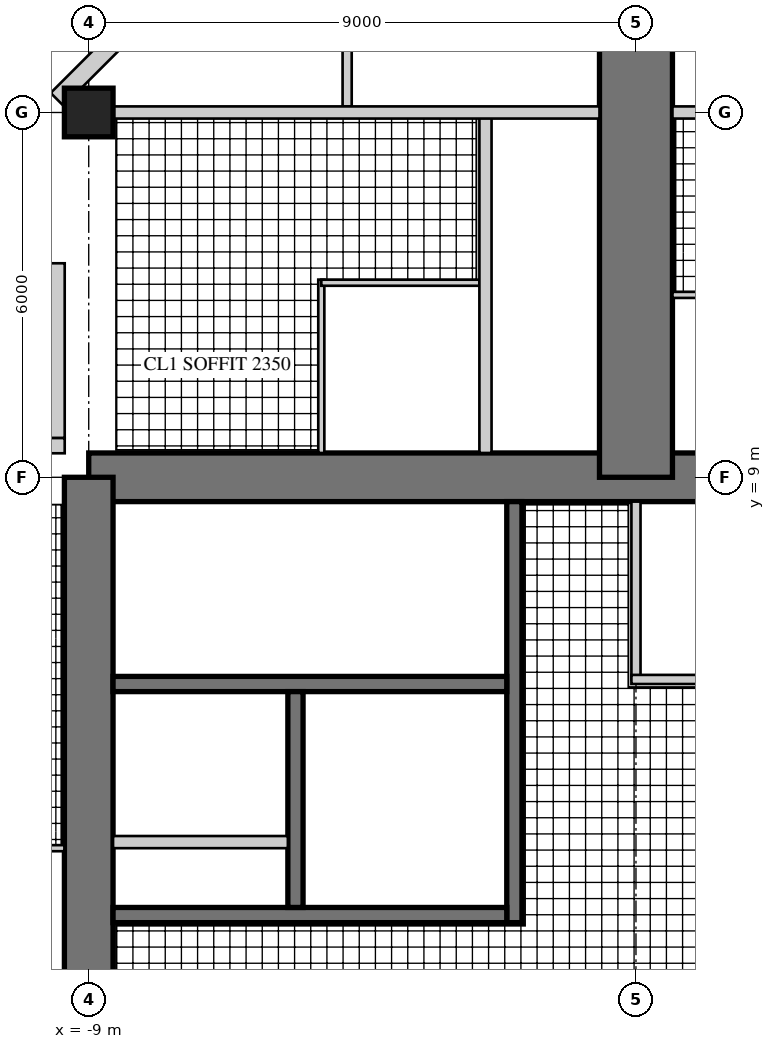
"""IFC4 building model, lengths in metres.
Left out: names, types, materials, properties, quantities, classifications, styles, units other than length and angle.
Written with IfcOpenShell. Run it as: python <this file> out.ifc"""

import sys

from ifc_helpers import new_model, si_unit, direction, frame, frame_2d, origin, origin_2d, place, context, subcontext, project, spatial, rectangle, hollow_rectangle, extrude, element, fill, save


model = new_model("IFC4")
c1 = context("Model", 3, precision=1e-05, world=origin(), true_north=direction((0.0, 1.0)))
c2 = subcontext(c1, "Body", "Model", "MODEL_VIEW")
j1 = project(units=[si_unit("LENGTHUNIT", "METRE"), si_unit("PLANEANGLEUNIT", "RADIAN")], contexts=[c1])
p1 = place(None, origin())
s1 = spatial("IfcSite", under=j1, at=p1, CompositionType="ELEMENT")
p2 = place(p1, origin())
s2 = spatial("IfcBuilding", under=s1, at=p2, CompositionType="ELEMENT")
p3 = place(p2, frame((0.0, 0.0, 225.5)))
s3 = spatial("IfcBuildingStorey", under=s2, at=p3, CompositionType="ELEMENT", Elevation=225.5)
p4 = place(p3, frame((9.0, 9.0, 0.0), z_axis=(0.0, 0.0, 1.0), x_axis=(-1.0, 0.0, 0.0)))
e1 = element("IfcWall", 1, at=p4, inside=s3, PredefinedType="SHEAR", context=c2, shape_type="SweptSolid", body=[
    extrude(rectangle(XDim=18.0, YDim=0.8, at=frame_2d((9.0, 0.0))), origin(), (0.0, 0.0, 1.0), 3.4),
])
p5 = place(p4, frame((9.8, 0.0, 0.0)))
e2 = element("IfcOpeningElement", 2, at=p5, cuts=e1, PredefinedType="OPENING", context=c2, shape_type="SweptSolid", body=[
    extrude(rectangle(XDim=1.0, YDim=2.4, at=frame_2d((0.5, 1.2))), frame((0.0, 0.41, 0.0), z_axis=(0.0, -1.0, 0.0), x_axis=(1.0, 0.0, 0.0)), (0.0, 0.0, 1.0), 0.82),
])
p6 = place(p3, frame((-9.0, 9.0, 0.0), z_axis=(0.0, 0.0, 1.0), x_axis=(0.0, -1.0, 0.0)))
e3 = element("IfcWall", 3, at=p6, inside=s3, PredefinedType="SHEAR", context=c2, shape_type="SweptSolid", body=[
    extrude(rectangle(XDim=18.0, YDim=0.8, at=frame_2d((9.0, 0.0))), origin(), (0.0, 0.0, 1.0), 3.4),
])
p7 = place(p6, frame((9.8, 0.0, 0.0)))
e4 = element("IfcOpeningElement", 4, at=p7, cuts=e3, PredefinedType="OPENING", context=c2, shape_type="SweptSolid", body=[
    extrude(rectangle(XDim=1.0, YDim=2.4, at=frame_2d((0.5, 1.2))), frame((0.0, 0.41, 0.0), z_axis=(0.0, -1.0, 0.0), x_axis=(1.0, 0.0, 0.0)), (0.0, 0.0, 1.0), 0.82),
])
p8 = place(p3, frame((-2.0, 1.675, 0.0), z_axis=(0.0, 0.0, 1.0), x_axis=(0.0, 1.0, 0.0)))
e5 = element("IfcWall", 5, at=p8, inside=s3, PredefinedType="SHEAR", context=c2, shape_type="SweptSolid", body=[
    extrude(rectangle(XDim=6.925, YDim=0.25, at=frame_2d((3.462, 0.0))), origin(), (0.0, 0.0, 1.0), 3.4),
])
p9 = place(p8, frame((0.725, 0.0, 0.0)))
e6 = element("IfcOpeningElement", 6, at=p9, cuts=e5, PredefinedType="OPENING", context=c2, shape_type="SweptSolid", body=[
    extrude(rectangle(XDim=1.0, YDim=2.1, at=frame_2d((0.5, 1.05))), frame((0.0, 0.135, 0.0), z_axis=(0.0, -1.0, 0.0), x_axis=(1.0, 0.0, 0.0)), (0.0, 0.0, 1.0), 0.27),
])
p10 = place(p3, frame((-2.125, 1.8, 0.0), z_axis=(0.0, 0.0, 1.0), x_axis=(-1.0, 0.0, 0.0)))
e7 = element("IfcWall", 7, at=p10, inside=s3, PredefinedType="SHEAR", context=c2, shape_type="SweptSolid", body=[
    extrude(rectangle(XDim=6.475, YDim=0.25, at=frame_2d((3.238, 0.0))), origin(), (0.0, 0.0, 1.0), 3.4),
])
p11 = place(p3, frame((-2.125, 5.6, 0.0), z_axis=(0.0, 0.0, 1.0), x_axis=(-1.0, 0.0, 0.0)))
e8 = element("IfcWall", 8, at=p11, inside=s3, PredefinedType="SHEAR", context=c2, shape_type="SweptSolid", body=[
    extrude(rectangle(XDim=6.475, YDim=0.25, at=frame_2d((3.238, 0.0))), origin(), (0.0, 0.0, 1.0), 3.4),
])
p12 = place(p11, frame((0.175, 0.0, 0.0)))
e9 = element("IfcOpeningElement", 9, at=p12, cuts=e8, PredefinedType="OPENING", context=c2, shape_type="SweptSolid", body=[
    extrude(rectangle(XDim=1.0, YDim=2.1, at=frame_2d((0.5, 1.05))), frame((0.0, 0.135, 0.0), z_axis=(0.0, -1.0, 0.0), x_axis=(1.0, 0.0, 0.0)), (0.0, 0.0, 1.0), 0.27),
])
p13 = place(p3, frame((-5.6, 1.925, 0.0), z_axis=(0.0, 0.0, 1.0), x_axis=(0.0, 1.0, 0.0)))
e10 = element("IfcWall", 10, at=p13, inside=s3, PredefinedType="SHEAR", context=c2, shape_type="SweptSolid", body=[
    extrude(rectangle(XDim=3.55, YDim=0.25, at=frame_2d((1.775, 0.0))), origin(), (0.0, 0.0, 1.0), 3.4),
])
p14 = place(p13, frame((1.525, 0.0, 0.0)))
e11 = element("IfcOpeningElement", 11, at=p14, cuts=e10, PredefinedType="OPENING", context=c2, shape_type="SweptSolid", body=[
    extrude(rectangle(XDim=1.1, YDim=2.2, at=frame_2d((0.55, 1.1))), frame((0.0, 0.135, 0.0), z_axis=(0.0, -1.0, 0.0), x_axis=(1.0, 0.0, 0.0)), (0.0, 0.0, 1.0), 0.27),
])
p15 = place(p13, frame((0.075, 0.0, 0.0)))
e12 = element("IfcOpeningElement", 12, at=p15, cuts=e10, PredefinedType="OPENING", context=c2, shape_type="SweptSolid", body=[
    extrude(rectangle(XDim=0.8, YDim=2.1, at=frame_2d((0.4, 1.05))), frame((0.0, 0.135, 0.0), z_axis=(0.0, -1.0, 0.0), x_axis=(1.0, 0.0, 0.0)), (0.0, 0.0, 1.0), 0.27),
])
p16 = place(p3, frame((-5.725, 3.0, 0.0), z_axis=(0.0, 0.0, 1.0), x_axis=(-1.0, 0.0, 0.0)))
e13 = element("IfcWall", 13, at=p16, inside=s3, PredefinedType="PARTITIONING", context=c2, shape_type="SweptSolid", body=[
    extrude(rectangle(XDim=2.875, YDim=0.2, at=frame_2d((1.438, 0.0))), origin(), (0.0, 0.0, 1.0), 3.4),
])
p17 = place(p3, frame((0.0, 9.0, 0.0), z_axis=(0.0, 0.0, 1.0), x_axis=(0.0, 1.0, 0.0)))
e14 = element("IfcWall", 14, at=p17, inside=s3, PredefinedType="SHEAR", context=c2, shape_type="SweptSolid", body=[
    extrude(rectangle(XDim=9.0, YDim=1.2, at=frame_2d((4.5, 0.0))), origin(), (0.0, 0.0, 1.0), 3.4),
])
p18 = place(p17, frame((3.8, 0.0, 0.0)))
e15 = element("IfcOpeningElement", 15, at=p18, cuts=e14, PredefinedType="OPENING", context=c2, shape_type="SweptSolid", body=[
    extrude(rectangle(XDim=1.0, YDim=2.15, at=frame_2d((0.5, 1.075))), frame((0.0, 0.61, 0.0), z_axis=(0.0, -1.0, 0.0), x_axis=(1.0, 0.0, 0.0)), (0.0, 0.0, 1.0), 1.22),
])
p19 = place(p17, frame((7.0, 0.0, 0.0)))
e16 = element("IfcOpeningElement", 16, at=p19, cuts=e14, PredefinedType="OPENING", context=c2, shape_type="SweptSolid", body=[
    extrude(rectangle(XDim=1.0, YDim=2.2, at=frame_2d((0.5, 1.1))), frame((0.0, 0.61, 0.0), z_axis=(0.0, -1.0, 0.0), x_axis=(1.0, 0.0, 0.0)), (0.0, 0.0, 1.0), 1.22),
])
p20 = place(p3, frame((-9.0, 15.0, 0.0), z_axis=(0.0, 0.0, 1.0), x_axis=(1.0, 0.0, 0.0)))
e17 = element("IfcColumn", 17, at=p20, inside=s3, PredefinedType="COLUMN", context=c2, shape_type="SweptSolid", body=[
    extrude(rectangle(XDim=0.8, YDim=0.8, at=origin_2d()), origin(), (0.0, 0.0, 1.0), 3.4),
])
p21 = place(p3, frame((-6.135, 18.6, 0.0), z_axis=(0.0, 0.0, 1.0), x_axis=(-0.707081278264, -0.707132283189, 0.0)))
e18 = element("IfcWall", 18, at=p21, inside=s3, PredefinedType="SOLIDWALL", context=c2, shape_type="SweptSolid", body=[
    extrude(rectangle(XDim=4.787, YDim=0.3, at=frame_2d((2.393, 0.0))), origin(), (0.0, 0.0, 1.0), 3.22),
])
p22 = place(p21, frame((1.943, 0.0, 0.3)))
e19 = element("IfcOpeningElement", 19, at=p22, cuts=e18, PredefinedType="OPENING", context=c2, shape_type="SweptSolid", body=[
    extrude(rectangle(XDim=0.9, YDim=2.4, at=frame_2d((0.45, 1.2))), frame((0.0, 0.16, 0.0), z_axis=(0.0, -1.0, 0.0), x_axis=(1.0, 0.0, 0.0)), (0.0, 0.0, 1.0), 0.32),
])
p23 = place(p3, frame((-9.52, 12.52, 0.0), z_axis=(0.0, 0.0, 1.0), x_axis=(0.0, -1.0, 0.0)))
e20 = element("IfcWall", 20, at=p23, inside=s3, PredefinedType="SOLIDWALL", context=c2, shape_type="SweptSolid", body=[
    extrude(rectangle(XDim=2.875, YDim=0.25, at=frame_2d((1.438, 0.0))), origin(), (0.0, 0.0, 1.0), 3.22),
])
p24 = place(p23, frame((0.6, 0.0, 0.0)))
e21 = element("IfcOpeningElement", 21, at=p24, cuts=e20, PredefinedType="OPENING", context=c2, shape_type="SweptSolid", body=[
    extrude(rectangle(XDim=1.0, YDim=2.2, at=frame_2d((0.5, 1.1))), frame((0.0, 0.135, 0.0), z_axis=(0.0, -1.0, 0.0), x_axis=(1.0, 0.0, 0.0)), (0.0, 0.0, 1.0), 0.27),
])
p25 = place(p3, frame((-9.395, 9.52, 0.0), z_axis=(0.0, 0.0, 1.0), x_axis=(-1.0, 0.0, 0.0)))
e22 = element("IfcWall", 22, at=p25, inside=s3, PredefinedType="SOLIDWALL", context=c2, shape_type="SweptSolid", body=[
    extrude(rectangle(XDim=3.125, YDim=0.25, at=frame_2d((1.562, 0.0))), origin(), (0.0, 0.0, 1.0), 3.22),
])
p26 = place(p25, frame((0.6, 0.0, 0.0)))
e23 = element("IfcOpeningElement", 23, at=p26, cuts=e22, PredefinedType="OPENING", context=c2, shape_type="SweptSolid", body=[
    extrude(rectangle(XDim=1.0, YDim=2.2, at=frame_2d((0.5, 1.1))), frame((0.0, 0.135, 0.0), z_axis=(0.0, -1.0, 0.0), x_axis=(1.0, 0.0, 0.0)), (0.0, 0.0, 1.0), 0.27),
])
p27 = place(p3, frame((0.0, 5.675, 0.0), z_axis=(0.0, 0.0, 1.0), x_axis=(0.0, 1.0, 0.0)))
e24 = element("IfcWall", 24, at=p27, inside=s3, PredefinedType="PARTITIONING", context=c2, shape_type="SweptSolid", body=[
    extrude(rectangle(XDim=2.925, YDim=0.15, at=frame_2d((1.462, 0.0))), origin(), (0.0, 0.0, 1.0), 3.22),
])
p28 = place(p27, frame((0.4, 0.0, 0.0)))
e25 = element("IfcOpeningElement", 25, at=p28, cuts=e24, PredefinedType="OPENING", context=c2, shape_type="SweptSolid", body=[
    extrude(rectangle(XDim=1.0, YDim=2.1, at=frame_2d((0.5, 1.05))), frame((0.0, 0.085, 0.0), z_axis=(0.0, -1.0, 0.0), x_axis=(1.0, 0.0, 0.0)), (0.0, 0.0, 1.0), 0.17),
])
p29 = place(p3, frame((1.675, 5.675, 0.0), z_axis=(0.0, 0.0, 1.0), x_axis=(-1.0, 0.0, 0.0)))
e26 = element("IfcWall", 26, at=p29, inside=s3, PredefinedType="PARTITIONING", context=c2, shape_type="SweptSolid", body=[
    extrude(rectangle(XDim=1.75, YDim=0.15, at=frame_2d((0.875, 0.0))), origin(), (0.0, 0.0, 1.0), 3.22),
])
p30 = place(p3, frame((-5.175, 9.4, 0.0), z_axis=(0.0, 0.0, 1.0), x_axis=(0.0, 1.0, 0.0)))
e27 = element("IfcWall", 27, at=p30, inside=s3, PredefinedType="PARTITIONING", context=c2, shape_type="SweptSolid", body=[
    extrude(rectangle(XDim=2.85, YDim=0.1, at=frame_2d((1.425, 0.0))), origin(), (0.0, 0.0, 1.0), 3.22),
])
p31 = place(p3, frame((-2.575, 12.2, 0.0), z_axis=(0.0, 0.0, 1.0), x_axis=(-1.0, 0.0, 0.0)))
e28 = element("IfcWall", 28, at=p31, inside=s3, PredefinedType="PARTITIONING", context=c2, shape_type="SweptSolid", body=[
    extrude(rectangle(XDim=2.6, YDim=0.1, at=frame_2d((1.3, 0.0))), origin(), (0.0, 0.0, 1.0), 3.22),
])
p32 = place(p31, frame((0.55, 0.0, 0.0)))
e29 = element("IfcOpeningElement", 29, at=p32, cuts=e28, PredefinedType="OPENING", context=c2, shape_type="SweptSolid", body=[
    extrude(rectangle(XDim=0.9, YDim=2.1, at=frame_2d((0.45, 1.05))), frame((0.0, 0.06, 0.0), z_axis=(0.0, -1.0, 0.0), x_axis=(1.0, 0.0, 0.0)), (0.0, 0.0, 1.0), 0.12),
])
p33 = place(p3, frame((2.8, 12.0, 0.0), z_axis=(0.0, 0.0, 1.0), x_axis=(-1.0, 0.0, 0.0)))
e30 = element("IfcWall", 30, at=p33, inside=s3, PredefinedType="PARTITIONING", context=c2, shape_type="SweptSolid", body=[
    extrude(rectangle(XDim=2.2, YDim=0.1, at=frame_2d((1.1, 0.0))), origin(), (0.0, 0.0, 1.0), 3.22),
])
p34 = place(p33, frame((0.55, 0.0, 0.0)))
e31 = element("IfcOpeningElement", 31, at=p34, cuts=e30, PredefinedType="OPENING", context=c2, shape_type="SweptSolid", body=[
    extrude(rectangle(XDim=0.9, YDim=2.1, at=frame_2d((0.45, 1.05))), frame((0.0, 0.06, 0.0), z_axis=(0.0, -1.0, 0.0), x_axis=(1.0, 0.0, 0.0)), (0.0, 0.0, 1.0), 0.12),
])
p35 = place(p3, frame((-2.475, 9.4, 0.0), z_axis=(0.0, 0.0, 1.0), x_axis=(0.0, 1.0, 0.0)))
e32 = element("IfcWall", 32, at=p35, inside=s3, PredefinedType="SOLIDWALL", context=c2, shape_type="SweptSolid", body=[
    extrude(rectangle(XDim=5.6, YDim=0.2, at=frame_2d((2.8, 0.0))), origin(), (0.0, 0.0, 1.0), 3.22),
])
p36 = place(p35, frame((3.4, 0.0, 0.0)))
e33 = element("IfcOpeningElement", 33, at=p36, cuts=e32, PredefinedType="OPENING", context=c2, shape_type="SweptSolid", body=[
    extrude(rectangle(XDim=1.0, YDim=2.15, at=frame_2d((0.5, 1.075))), frame((0.0, 0.11, 0.0), z_axis=(0.0, -1.0, 0.0), x_axis=(1.0, 0.0, 0.0)), (0.0, 0.0, 1.0), 0.22),
])
p37 = place(p3, frame((-4.75, 15.1, 0.0), z_axis=(0.0, 0.0, 1.0), x_axis=(0.0, 1.0, 0.0)))
e34 = element("IfcWall", 34, at=p37, inside=s3, PredefinedType="PARTITIONING", context=c2, shape_type="SweptSolid", body=[
    extrude(rectangle(XDim=2.5, YDim=0.15, at=frame_2d((1.25, 0.0))), origin(), (0.0, 0.0, 1.0), 3.22),
])
p38 = place(p37, frame((0.6, 0.0, 0.0)))
e35 = element("IfcOpeningElement", 35, at=p38, cuts=e34, PredefinedType="OPENING", context=c2, shape_type="SweptSolid", body=[
    extrude(rectangle(XDim=1.0, YDim=2.1, at=frame_2d((0.5, 1.05))), frame((0.0, 0.085, 0.0), z_axis=(0.0, -1.0, 0.0), x_axis=(1.0, 0.0, 0.0)), (0.0, 0.0, 1.0), 0.17),
])
p39 = place(p3, frame((8.6, 15.0, 0.0), z_axis=(0.0, 0.0, 1.0), x_axis=(-1.0, 0.0, 0.0)))
e36 = element("IfcWall", 36, at=p39, inside=s3, PredefinedType="SOLIDWALL", context=c2, shape_type="SweptSolid", body=[
    extrude(rectangle(XDim=8.0, YDim=0.2, at=frame_2d((4.0, 0.0))), origin(), (0.0, 0.0, 1.0), 2.52),
])
p40 = place(p3, frame((-0.6, 15.0, 0.0), z_axis=(0.0, 0.0, 1.0), x_axis=(-1.0, 0.0, 0.0)))
e37 = element("IfcWall", 37, at=p40, inside=s3, PredefinedType="SOLIDWALL", context=c2, shape_type="SweptSolid", body=[
    extrude(rectangle(XDim=8.0, YDim=0.2, at=frame_2d((4.0, 0.0))), origin(), (0.0, 0.0, 1.0), 2.52),
])
p41 = place(p40, frame((0.35, 0.0, 0.0)))
e38 = element("IfcOpeningElement", 38, at=p41, cuts=e37, PredefinedType="OPENING", context=c2, shape_type="SweptSolid", body=[
    extrude(rectangle(XDim=1.0, YDim=2.2, at=frame_2d((0.5, 1.1))), frame((0.0, 0.11, 0.0), z_axis=(0.0, -1.0, 0.0), x_axis=(1.0, 0.0, 0.0)), (0.0, 0.0, 1.0), 0.22),
])
p42 = place(p3, frame((-9.4, 2.9, 0.0), z_axis=(0.0, 0.0, 1.0), x_axis=(-1.0, 0.0, 0.0)))
e39 = element("IfcWall", 39, at=p42, inside=s3, PredefinedType="PARTITIONING", context=c2, shape_type="SweptSolid", body=[
    extrude(rectangle(XDim=2.85, YDim=0.1, at=frame_2d((1.425, 0.0))), origin(), (0.0, 0.0, 1.0), 3.22),
])
p43 = place(p24, origin())
e40 = element("IfcDoor", 40, at=p43, inside=s3, OperationType="SINGLE_SWING_RIGHT", PredefinedType="DOOR", context=c2, shape_type="SweptSolid", body=[
    extrude(hollow_rectangle(XDim=1.0, YDim=2.2, WallThickness=0.06, at=frame_2d((0.5, 1.1))), frame((0.0, 0.025, 0.0), z_axis=(0.0, -1.0, 0.0), x_axis=(1.0, 0.0, 0.0)), (0.0, 0.0, 1.0), 0.05),
    extrude(rectangle(XDim=0.879, YDim=2.079, at=frame_2d((0.5, 1.1))), frame((0.0, 0.025, 0.0), z_axis=(0.0, -1.0, 0.0), x_axis=(1.0, 0.0, 0.0)), (0.0, 0.0, 1.0), 0.05),
])
fill(e21, e40)
p44 = place(p28, frame((1.0, 0.0, 0.0), z_axis=(0.0, 0.0, 1.0), x_axis=(-1.0, 0.0, 0.0)))
e41 = element("IfcDoor", 41, at=p44, inside=s3, OperationType="SINGLE_SWING_RIGHT", PredefinedType="DOOR", context=c2, shape_type="SweptSolid", body=[
    extrude(rectangle(XDim=1.0, YDim=2.1, at=frame_2d((0.5, 1.05))), frame((0.0, 0.025, 0.0), z_axis=(0.0, -1.0, 0.0), x_axis=(1.0, 0.0, 0.0)), (0.0, 0.0, 1.0), 0.05),
])
fill(e25, e41)
p45 = place(p32, origin())
e42 = element("IfcDoor", 42, at=p45, inside=s3, OperationType="SINGLE_SWING_LEFT", PredefinedType="DOOR", context=c2, shape_type="SweptSolid", body=[
    extrude(rectangle(XDim=0.9, YDim=2.1, at=frame_2d((0.45, 1.05))), frame((0.0, 0.025, 0.0), z_axis=(0.0, -1.0, 0.0), x_axis=(1.0, 0.0, 0.0)), (0.0, 0.0, 1.0), 0.05),
])
fill(e29, e42)
p46 = place(p36, origin())
e43 = element("IfcDoor", 43, at=p46, inside=s3, OperationType="SINGLE_SWING_LEFT", PredefinedType="DOOR", context=c2, shape_type="SweptSolid", body=[
    extrude(rectangle(XDim=1.0, YDim=2.15, at=frame_2d((0.5, 1.075))), frame((0.0, 0.025, 0.0), z_axis=(0.0, -1.0, 0.0), x_axis=(1.0, 0.0, 0.0)), (0.0, 0.0, 1.0), 0.05),
])
fill(e33, e43)
p47 = place(p38, origin())
e44 = element("IfcDoor", 44, at=p47, inside=s3, OperationType="SINGLE_SWING_LEFT", PredefinedType="DOOR", context=c2, shape_type="SweptSolid", body=[
    extrude(rectangle(XDim=1.0, YDim=2.1, at=frame_2d((0.5, 1.05))), frame((0.0, 0.025, 0.0), z_axis=(0.0, -1.0, 0.0), x_axis=(1.0, 0.0, 0.0)), (0.0, 0.0, 1.0), 0.05),
])
fill(e35, e44)
p48 = place(p41, frame((1.0, 0.0, 0.0), z_axis=(0.0, 0.0, 1.0), x_axis=(-1.0, 0.0, 0.0)))
e45 = element("IfcDoor", 45, at=p48, inside=s3, OperationType="SINGLE_SWING_RIGHT", PredefinedType="DOOR", context=c2, shape_type="SweptSolid", body=[
    extrude(rectangle(XDim=1.0, YDim=2.2, at=frame_2d((0.5, 1.1))), frame((0.0, 0.025, 0.0), z_axis=(0.0, -1.0, 0.0), x_axis=(1.0, 0.0, 0.0)), (0.0, 0.0, 1.0), 0.05),
])
fill(e38, e45)
p49 = place(p18, frame((1.0, 0.0, 0.0), z_axis=(0.0, 0.0, 1.0), x_axis=(-1.0, 0.0, 0.0)))
e46 = element("IfcDoor", 46, at=p49, inside=s3, OperationType="SINGLE_SWING_RIGHT", PredefinedType="DOOR", context=c2, shape_type="SweptSolid", body=[
    extrude(rectangle(XDim=1.0, YDim=2.15, at=frame_2d((0.5, 1.075))), frame((0.0, 0.025, 0.0), z_axis=(0.0, -1.0, 0.0), x_axis=(1.0, 0.0, 0.0)), (0.0, 0.0, 1.0), 0.05),
])
fill(e15, e46)
p50 = place(p5, origin())
e47 = element("IfcDoor", 47, at=p50, inside=s3, OperationType="SINGLE_SWING_RIGHT", PredefinedType="DOOR", context=c2, shape_type="SweptSolid", body=[
    extrude(rectangle(XDim=1.0, YDim=2.4, at=frame_2d((0.5, 1.2))), frame((0.0, 0.055, 0.0), z_axis=(0.0, -1.0, 0.0), x_axis=(1.0, 0.0, 0.0)), (0.0, 0.0, 1.0), 0.05),
])
fill(e2, e47)
p51 = place(p9, origin())
e48 = element("IfcDoor", 48, at=p51, inside=s3, OperationType="SINGLE_SWING_LEFT", PredefinedType="DOOR", context=c2, shape_type="SweptSolid", body=[
    extrude(rectangle(XDim=1.0, YDim=2.1, at=frame_2d((0.5, 1.05))), frame((0.0, 0.025, 0.0), z_axis=(0.0, -1.0, 0.0), x_axis=(1.0, 0.0, 0.0)), (0.0, 0.0, 1.0), 0.05),
])
fill(e6, e48)
p52 = place(p12, frame((1.0, 0.0, 0.0), z_axis=(0.0, 0.0, 1.0), x_axis=(-1.0, 0.0, 0.0)))
e49 = element("IfcDoor", 49, at=p52, inside=s3, OperationType="SINGLE_SWING_RIGHT", PredefinedType="DOOR", context=c2, shape_type="SweptSolid", body=[
    extrude(rectangle(XDim=1.0, YDim=2.1, at=frame_2d((0.5, 1.05))), frame((0.0, 0.025, 0.0), z_axis=(0.0, -1.0, 0.0), x_axis=(1.0, 0.0, 0.0)), (0.0, 0.0, 1.0), 0.05),
])
fill(e9, e49)
p53 = place(p14, origin())
e50 = element("IfcDoor", 50, at=p53, inside=s3, OperationType="DOUBLE_DOOR_SLIDING", PredefinedType="DOOR", context=c2, shape_type="SweptSolid", body=[
    extrude(rectangle(XDim=1.1, YDim=2.2, at=frame_2d((0.55, 1.1))), frame((0.0, 0.025, 0.0), z_axis=(0.0, -1.0, 0.0), x_axis=(1.0, 0.0, 0.0)), (0.0, 0.0, 1.0), 0.05),
])
fill(e11, e50)
p54 = place(p15, origin())
e51 = element("IfcDoor", 51, at=p54, inside=s3, OperationType="SINGLE_SWING_LEFT", PredefinedType="DOOR", context=c2, shape_type="SweptSolid", body=[
    extrude(rectangle(XDim=0.8, YDim=2.1, at=frame_2d((0.4, 1.05))), frame((0.0, 0.025, 0.0), z_axis=(0.0, -1.0, 0.0), x_axis=(1.0, 0.0, 0.0)), (0.0, 0.0, 1.0), 0.05),
])
fill(e12, e51)
save(model, sys.argv[1])
